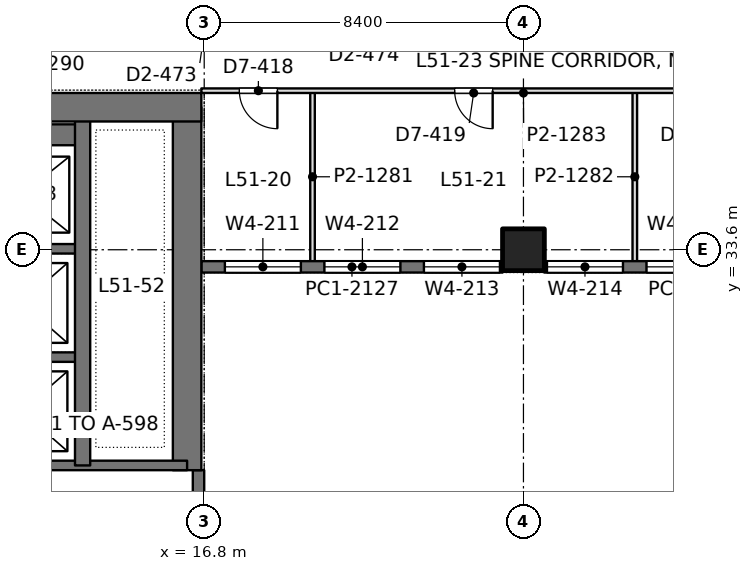
"""IFC4 building model, lengths in metres.
Left out: names, types, materials, properties, quantities, classifications, styles, units other than length and angle.
Written with IfcOpenShell. Run it as: python <this file> out.ifc"""

import sys

from ifc_helpers import new_model, si_unit, direction, frame, frame_2d, origin, origin_2d, place, context, subcontext, project, spatial, rectangle, extrude, element, fill, save


model = new_model("IFC4")
c1 = context("Model", 3, precision=1e-05, world=origin(), true_north=direction((0.0, 1.0)))
c2 = subcontext(c1, "Body", "Model", "MODEL_VIEW")
j1 = project(units=[si_unit("LENGTHUNIT", "METRE"), si_unit("PLANEANGLEUNIT", "RADIAN")], contexts=[c1])
p1 = place(None, origin())
s1 = spatial("IfcSite", under=j1, at=p1, CompositionType="ELEMENT")
p2 = place(p1, origin())
s2 = spatial("IfcBuilding", under=s1, at=p2, CompositionType="ELEMENT")
p3 = place(p2, frame((0.0, 0.0, 223.8)))
s3 = spatial("IfcBuildingStorey", under=s2, at=p3, CompositionType="ELEMENT", Elevation=223.8)
p4 = place(p3, frame((25.2, 33.6, 0.0), z_axis=(0.0, 0.0, 1.0), x_axis=(1.0, 0.0, 0.0)))
e1 = element("IfcColumn", 1, at=p4, inside=s3, PredefinedType="COLUMN", context=c2, shape_type="SweptSolid", body=[
    extrude(rectangle(XDim=1.1, YDim=1.1, at=origin_2d()), origin(), (0.0, 0.0, 1.0), 4.2),
])
p5 = place(p3, frame((-1.125, 37.35, 0.0), z_axis=(0.0, 0.0, 1.0), x_axis=(1.0, 0.0, 0.0)))
e2 = element("IfcWall", 2, at=p5, inside=s3, PredefinedType="SHEAR", context=c2, shape_type="SweptSolid", body=[
    extrude(rectangle(XDim=17.85, YDim=0.75, at=frame_2d((8.925, 0.0))), origin(), (0.0, 0.0, 1.0), 4.2),
])
p6 = place(p5, frame((8.875, 0.0, 0.0)))
e3 = element("IfcOpeningElement", 3, at=p6, cuts=e2, PredefinedType="OPENING", context=c2, shape_type="SweptSolid", body=[
    extrude(rectangle(XDim=1.8, YDim=2.4, at=frame_2d((0.9, 1.2))), frame((0.0, 0.385, 0.0), z_axis=(0.0, -1.0, 0.0), x_axis=(1.0, 0.0, 0.0)), (0.0, 0.0, 1.0), 0.77),
])
p7 = place(p3, frame((16.35, 27.8, 0.0), z_axis=(0.0, 0.0, 1.0), x_axis=(0.0, 1.0, 0.0)))
e4 = element("IfcWall", 4, at=p7, inside=s3, PredefinedType="SHEAR", context=c2, shape_type="SweptSolid", body=[
    extrude(rectangle(XDim=9.55, YDim=0.75, at=frame_2d((4.775, 0.0))), origin(), (0.0, 0.0, 1.0), 4.2),
])
p8 = place(p3, frame((13.6, 27.925, 0.0), z_axis=(0.0, 0.0, 1.0), x_axis=(0.0, 1.0, 0.0)))
e5 = element("IfcWall", 5, at=p8, inside=s3, PredefinedType="SHEAR", context=c2, shape_type="SweptSolid", body=[
    extrude(rectangle(XDim=9.425, YDim=0.4, at=frame_2d((4.712, 0.0))), origin(), (0.0, 0.0, 1.0), 4.2),
])
p9 = place(p3, frame((10.4, 27.925, 0.0), z_axis=(0.0, 0.0, 1.0), x_axis=(1.0, 0.0, 0.0)))
e6 = element("IfcWall", 6, at=p9, inside=s3, PredefinedType="SHEAR", context=c2, shape_type="SweptSolid", body=[
    extrude(rectangle(XDim=5.95, YDim=0.25, at=frame_2d((2.975, 0.0))), origin(), (0.0, 0.0, 1.0), 4.2),
])
for number, where, z_axis, x_axis in (
    (7, (10.4, 30.775, 0.0), (0.0, 0.0, 1.0), (1.0, 0.0, 0.0)),
    (8, (10.4, 33.625, 0.0), (0.0, 0.0, 1.0), (1.0, 0.0, 0.0)),
):
    element("IfcWall", number, at=place(p3, frame(where, z_axis=z_axis, x_axis=x_axis)), inside=s3, PredefinedType="SHEAR", context=c2, shape_type="SweptSolid", body=[
        extrude(rectangle(XDim=3.2, YDim=0.25, at=frame_2d((1.6, 0.0))), origin(), (0.0, 0.0, 1.0), 4.2),
    ])
p10 = place(p3, frame((10.4, 36.625, 0.0), z_axis=(0.0, 0.0, 1.0), x_axis=(1.0, 0.0, 0.0)))
e9 = element("IfcWall", 9, at=p10, inside=s3, PredefinedType="SHEAR", context=c2, shape_type="SweptSolid", body=[
    extrude(rectangle(XDim=3.2, YDim=0.55, at=frame_2d((1.6, 0.0))), origin(), (0.0, 0.0, 1.0), 4.2),
])
p11 = place(p3, frame((16.65, 17.1, 0.0), z_axis=(0.0, 0.0, 1.0), x_axis=(0.0, 1.0, 0.0)))
e10 = element("IfcWall", 10, at=p11, inside=s3, PredefinedType="SOLIDWALL", context=c2, shape_type="SweptSolid", body=[
    extrude(rectangle(XDim=10.7, YDim=0.3, at=frame_2d((5.35, 0.0))), origin(), (0.0, 0.0, 1.0), 4.05),
])
p12 = place(p11, frame((0.55, 0.0, 0.9)))
e11 = element("IfcOpeningElement", 11, at=p12, cuts=e10, PredefinedType="OPENING", context=c2, shape_type="SweptSolid", body=[
    extrude(rectangle(XDim=2.0, YDim=1.9, at=frame_2d((1.0, 0.95))), frame((0.0, 0.16, 0.0), z_axis=(0.0, -1.0, 0.0), x_axis=(1.0, 0.0, 0.0)), (0.0, 0.0, 1.0), 0.32),
])
p13 = place(p11, frame((2.9, 0.0, 0.9)))
e12 = element("IfcOpeningElement", 12, at=p13, cuts=e10, PredefinedType="OPENING", context=c2, shape_type="SweptSolid", body=[
    extrude(rectangle(XDim=2.0, YDim=1.9, at=frame_2d((1.0, 0.95))), frame((0.0, 0.16, 0.0), z_axis=(0.0, -1.0, 0.0), x_axis=(1.0, 0.0, 0.0)), (0.0, 0.0, 1.0), 0.32),
])
p14 = place(p11, frame((7.675, 0.0, 0.9)))
e13 = element("IfcOpeningElement", 13, at=p14, cuts=e10, PredefinedType="OPENING", context=c2, shape_type="SweptSolid", body=[
    extrude(rectangle(XDim=2.0, YDim=1.9, at=frame_2d((1.0, 0.95))), frame((0.0, 0.16, 0.0), z_axis=(0.0, -1.0, 0.0), x_axis=(1.0, 0.0, 0.0)), (0.0, 0.0, 1.0), 0.32),
])
p15 = place(p3, frame((16.725, 33.15, 0.0), z_axis=(0.0, 0.0, 1.0), x_axis=(1.0, 0.0, 0.0)))
e14 = element("IfcWall", 14, at=p15, inside=s3, PredefinedType="SOLIDWALL", context=c2, shape_type="SweptSolid", body=[
    extrude(rectangle(XDim=7.925, YDim=0.3, at=frame_2d((3.962, 0.0))), origin(), (0.0, 0.0, 1.0), 4.05),
])
p16 = place(p15, frame((0.619, 0.0, 0.9)))
e15 = element("IfcOpeningElement", 15, at=p16, cuts=e14, PredefinedType="OPENING", context=c2, shape_type="SweptSolid", body=[
    extrude(rectangle(XDim=2.0, YDim=1.9, at=frame_2d((1.0, 0.95))), frame((0.0, 0.16, 0.0), z_axis=(0.0, -1.0, 0.0), x_axis=(1.0, 0.0, 0.0)), (0.0, 0.0, 1.0), 0.32),
])
p17 = place(p15, frame((3.238, 0.0, 0.9)))
e16 = element("IfcOpeningElement", 16, at=p17, cuts=e14, PredefinedType="OPENING", context=c2, shape_type="SweptSolid", body=[
    extrude(rectangle(XDim=2.0, YDim=1.9, at=frame_2d((1.0, 0.95))), frame((0.0, 0.16, 0.0), z_axis=(0.0, -1.0, 0.0), x_axis=(1.0, 0.0, 0.0)), (0.0, 0.0, 1.0), 0.32),
])
p18 = place(p15, frame((5.856, 0.0, 0.9)))
e17 = element("IfcOpeningElement", 17, at=p18, cuts=e14, PredefinedType="OPENING", context=c2, shape_type="SweptSolid", body=[
    extrude(rectangle(XDim=2.0, YDim=1.9, at=frame_2d((1.0, 0.95))), frame((0.0, 0.16, 0.0), z_axis=(0.0, -1.0, 0.0), x_axis=(1.0, 0.0, 0.0)), (0.0, 0.0, 1.0), 0.32),
])
p19 = place(p3, frame((25.75, 33.15, 0.0), z_axis=(0.0, 0.0, 1.0), x_axis=(1.0, 0.0, 0.0)))
e18 = element("IfcWall", 18, at=p19, inside=s3, PredefinedType="SOLIDWALL", context=c2, shape_type="SweptSolid", body=[
    extrude(rectangle(XDim=7.925, YDim=0.3, at=frame_2d((3.962, 0.0))), origin(), (0.0, 0.0, 1.0), 4.05),
])
p20 = place(p19, frame((0.069, 0.0, 0.9)))
e19 = element("IfcOpeningElement", 19, at=p20, cuts=e18, PredefinedType="OPENING", context=c2, shape_type="SweptSolid", body=[
    extrude(rectangle(XDim=2.0, YDim=1.9, at=frame_2d((1.0, 0.95))), frame((0.0, 0.16, 0.0), z_axis=(0.0, -1.0, 0.0), x_axis=(1.0, 0.0, 0.0)), (0.0, 0.0, 1.0), 0.32),
])
p21 = place(p19, frame((2.688, 0.0, 0.9)))
e20 = element("IfcOpeningElement", 20, at=p21, cuts=e18, PredefinedType="OPENING", context=c2, shape_type="SweptSolid", body=[
    extrude(rectangle(XDim=2.0, YDim=1.9, at=frame_2d((1.0, 0.95))), frame((0.0, 0.16, 0.0), z_axis=(0.0, -1.0, 0.0), x_axis=(1.0, 0.0, 0.0)), (0.0, 0.0, 1.0), 0.32),
])
p22 = place(p19, frame((5.306, 0.0, 0.9)))
e21 = element("IfcOpeningElement", 21, at=p22, cuts=e18, PredefinedType="OPENING", context=c2, shape_type="SweptSolid", body=[
    extrude(rectangle(XDim=2.0, YDim=1.9, at=frame_2d((1.0, 0.95))), frame((0.0, 0.16, 0.0), z_axis=(0.0, -1.0, 0.0), x_axis=(1.0, 0.0, 0.0)), (0.0, 0.0, 1.0), 0.32),
])
for number, where, z_axis, x_axis in (
    (22, (19.65, 33.298, 0.0), (0.0, 0.0, 1.0), (0.0, 1.0, 0.0)),
    (23, (28.13, 33.298, 0.0), (0.0, 0.0, 1.0), (0.0, 1.0, 0.0)),
):
    element("IfcWall", number, at=place(p3, frame(where, z_axis=z_axis, x_axis=x_axis)), inside=s3, PredefinedType="PARTITIONING", context=c2, shape_type="SweptSolid", body=[
        extrude(rectangle(XDim=4.444, YDim=0.12, at=frame_2d((2.222, 0.0))), origin(), (0.0, 0.0, 1.0), 3.36),
    ])
p23 = place(p3, frame((16.725, 37.785, 0.0), z_axis=(0.0, 0.0, 1.0), x_axis=(1.0, 0.0, 0.0)))
e24 = element("IfcWall", 24, at=p23, inside=s3, PredefinedType="PARTITIONING", context=c2, shape_type="SweptSolid", body=[
    extrude(rectangle(XDim=16.95, YDim=0.12, at=frame_2d((8.475, 0.0))), origin(), (0.0, 0.0, 1.0), 3.55),
])
p24 = place(p23, frame((1.0, 0.0, 0.0)))
e25 = element("IfcOpeningElement", 25, at=p24, cuts=e24, PredefinedType="OPENING", context=c2, shape_type="SweptSolid", body=[
    extrude(rectangle(XDim=1.0, YDim=2.4, at=frame_2d((0.5, 1.2))), frame((0.0, 0.07, 0.0), z_axis=(0.0, -1.0, 0.0), x_axis=(1.0, 0.0, 0.0)), (0.0, 0.0, 1.0), 0.14),
])
p25 = place(p23, frame((6.665, 0.0, 0.0)))
e26 = element("IfcOpeningElement", 26, at=p25, cuts=e24, PredefinedType="OPENING", context=c2, shape_type="SweptSolid", body=[
    extrude(rectangle(XDim=1.0, YDim=2.4, at=frame_2d((0.5, 1.2))), frame((0.0, 0.07, 0.0), z_axis=(0.0, -1.0, 0.0), x_axis=(1.0, 0.0, 0.0)), (0.0, 0.0, 1.0), 0.14),
])
p26 = place(p23, frame((13.64, 0.0, 0.0)))
e27 = element("IfcOpeningElement", 27, at=p26, cuts=e24, PredefinedType="OPENING", context=c2, shape_type="SweptSolid", body=[
    extrude(rectangle(XDim=1.0, YDim=2.4, at=frame_2d((0.5, 1.2))), frame((0.0, 0.07, 0.0), z_axis=(0.0, -1.0, 0.0), x_axis=(1.0, 0.0, 0.0)), (0.0, 0.0, 1.0), 0.14),
])
p27 = place(p16, origin())
e28 = element("IfcWindow", 28, at=p27, inside=s3, PartitioningType="SINGLE_PANEL", PredefinedType="WINDOW", context=c2, shape_type="SweptSolid", body=[
    extrude(rectangle(XDim=2.0, YDim=1.9, at=frame_2d((1.0, 0.95))), frame((0.0, 0.03, 0.0), z_axis=(0.0, -1.0, 0.0), x_axis=(1.0, 0.0, 0.0)), (0.0, 0.0, 1.0), 0.06),
])
fill(e15, e28)
p28 = place(p17, origin())
e29 = element("IfcWindow", 29, at=p28, inside=s3, PartitioningType="SINGLE_PANEL", PredefinedType="WINDOW", context=c2, shape_type="SweptSolid", body=[
    extrude(rectangle(XDim=2.0, YDim=1.9, at=frame_2d((1.0, 0.95))), frame((0.0, 0.03, 0.0), z_axis=(0.0, -1.0, 0.0), x_axis=(1.0, 0.0, 0.0)), (0.0, 0.0, 1.0), 0.06),
])
fill(e16, e29)
p29 = place(p18, origin())
e30 = element("IfcWindow", 30, at=p29, inside=s3, PartitioningType="SINGLE_PANEL", PredefinedType="WINDOW", context=c2, shape_type="SweptSolid", body=[
    extrude(rectangle(XDim=2.0, YDim=1.9, at=frame_2d((1.0, 0.95))), frame((0.0, 0.03, 0.0), z_axis=(0.0, -1.0, 0.0), x_axis=(1.0, 0.0, 0.0)), (0.0, 0.0, 1.0), 0.06),
])
fill(e17, e30)
p30 = place(p20, origin())
e31 = element("IfcWindow", 31, at=p30, inside=s3, PartitioningType="SINGLE_PANEL", PredefinedType="WINDOW", context=c2, shape_type="SweptSolid", body=[
    extrude(rectangle(XDim=2.0, YDim=1.9, at=frame_2d((1.0, 0.95))), frame((0.0, 0.03, 0.0), z_axis=(0.0, -1.0, 0.0), x_axis=(1.0, 0.0, 0.0)), (0.0, 0.0, 1.0), 0.06),
])
fill(e19, e31)
p31 = place(p21, origin())
e32 = element("IfcWindow", 32, at=p31, inside=s3, PartitioningType="SINGLE_PANEL", PredefinedType="WINDOW", context=c2, shape_type="SweptSolid", body=[
    extrude(rectangle(XDim=2.0, YDim=1.9, at=frame_2d((1.0, 0.95))), frame((0.0, 0.03, 0.0), z_axis=(0.0, -1.0, 0.0), x_axis=(1.0, 0.0, 0.0)), (0.0, 0.0, 1.0), 0.06),
])
fill(e20, e32)
p32 = place(p24, frame((1.0, 0.0, 0.0), z_axis=(0.0, 0.0, 1.0), x_axis=(-1.0, 0.0, 0.0)))
e33 = element("IfcDoor", 33, at=p32, inside=s3, OperationType="SINGLE_SWING_LEFT", PredefinedType="DOOR", context=c2, shape_type="SweptSolid", body=[
    extrude(rectangle(XDim=1.0, YDim=2.4, at=frame_2d((0.5, 1.2))), frame((0.0, 0.025, 0.0), z_axis=(0.0, -1.0, 0.0), x_axis=(1.0, 0.0, 0.0)), (0.0, 0.0, 1.0), 0.05),
])
fill(e25, e33)
p33 = place(p25, frame((1.0, 0.0, 0.0), z_axis=(0.0, 0.0, 1.0), x_axis=(-1.0, 0.0, 0.0)))
e34 = element("IfcDoor", 34, at=p33, inside=s3, OperationType="SINGLE_SWING_LEFT", PredefinedType="DOOR", context=c2, shape_type="SweptSolid", body=[
    extrude(rectangle(XDim=1.0, YDim=2.4, at=frame_2d((0.5, 1.2))), frame((0.0, 0.025, 0.0), z_axis=(0.0, -1.0, 0.0), x_axis=(1.0, 0.0, 0.0)), (0.0, 0.0, 1.0), 0.05),
])
fill(e26, e34)
save(model, sys.argv[1])
